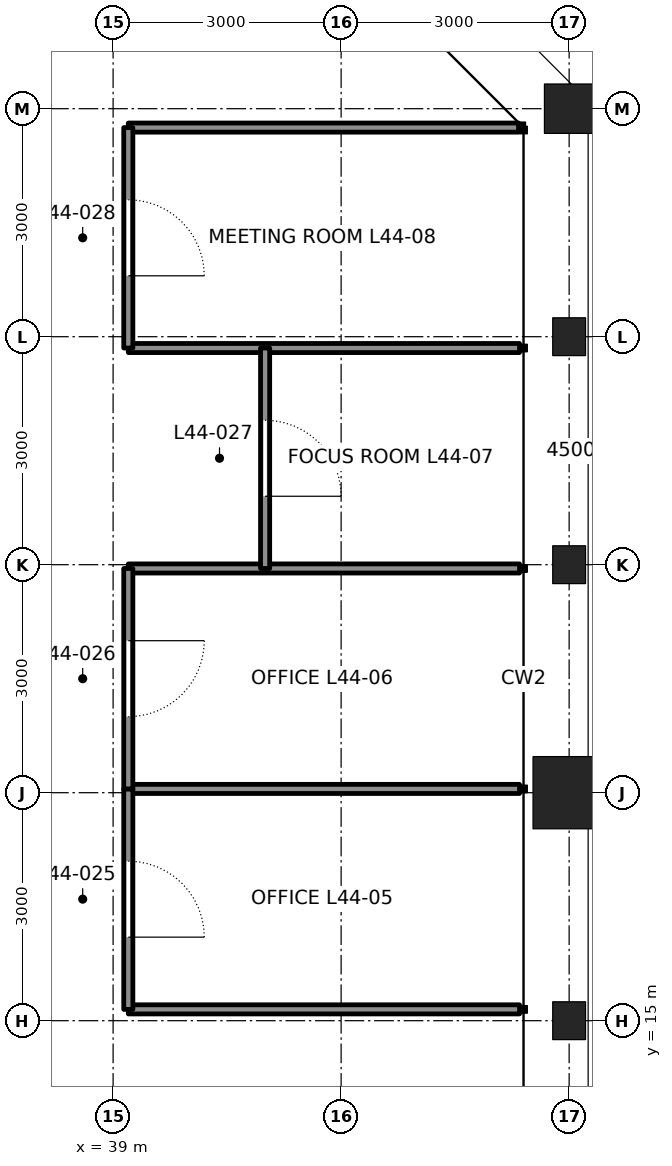
"""IFC4 building model, lengths in metres.
Left out: names, types, materials, properties, quantities, classifications, styles, units other than length and angle.
Written with IfcOpenShell. Run it as: python <this file> out.ifc"""

import sys

from ifc_helpers import new_model, si_unit, direction, frame, frame_2d, origin, origin_2d, place, context, subcontext, project, spatial, rectangle, hollow_rectangle, i_section, extrude, element, fill, save


model = new_model("IFC4")
c1 = context("Model", 3, precision=1e-05, world=origin(), true_north=direction((0.0, 1.0)))
c2 = subcontext(c1, "Body", "Model", "MODEL_VIEW")
j1 = project(units=[si_unit("LENGTHUNIT", "METRE"), si_unit("PLANEANGLEUNIT", "RADIAN")], contexts=[c1])
p1 = place(None, origin())
s1 = spatial("IfcSite", under=j1, at=p1, CompositionType="ELEMENT")
p2 = place(p1, origin())
s2 = spatial("IfcBuilding", under=s1, at=p2, CompositionType="ELEMENT")
p3 = place(p2, frame((0.0, 0.0, 201.3)))
s3 = spatial("IfcBuildingStorey", under=s2, at=p3, CompositionType="ELEMENT", Elevation=201.3)
p4 = place(p3, frame((45.0, 15.0, 0.0), z_axis=(0.0, 0.0, 1.0), x_axis=(1.0, 0.0, 0.0)))
e1 = element("IfcColumn", 1, at=p4, inside=s3, PredefinedType="COLUMN", context=c2, shape_type="SweptSolid", body=[
    extrude(i_section(OverallWidth=0.432, OverallDepth=0.498, WebThickness=0.056, FlangeThickness=0.089, at=origin_2d()), origin(), (0.0, 0.0, 1.0), 4.2),
])
p5 = place(p3, frame((45.0, 18.0, 0.0), z_axis=(0.0, 0.0, 1.0), x_axis=(1.0, 0.0, 0.0)))
e2 = element("IfcColumn", 2, at=p5, inside=s3, PredefinedType="COLUMN", context=c2, shape_type="SweptSolid", body=[
    extrude(hollow_rectangle(XDim=0.95, YDim=0.95, WallThickness=0.11, at=origin_2d()), origin(), (0.0, 0.0, 1.0), 4.2),
])
for number, where, z_axis, x_axis in (
    (3, (45.0, 21.0, 0.0), (0.0, 0.0, 1.0), (1.0, 0.0, 0.0)),
    (4, (45.0, 24.0, 0.0), (0.0, 0.0, 1.0), (1.0, 0.0, 0.0)),
):
    element("IfcColumn", number, at=place(p3, frame(where, z_axis=z_axis, x_axis=x_axis)), inside=s3, PredefinedType="COLUMN", context=c2, shape_type="SweptSolid", body=[
        extrude(i_section(OverallWidth=0.432, OverallDepth=0.498, WebThickness=0.056, FlangeThickness=0.089, at=origin_2d()), origin(), (0.0, 0.0, 1.0), 4.2),
    ])
p6 = place(p3, frame((45.0, 27.0, 0.0), z_axis=(0.0, 0.0, 1.0), x_axis=(1.0, 0.0, 0.0)))
e5 = element("IfcColumn", 5, at=p6, inside=s3, PredefinedType="COLUMN", context=c2, shape_type="SweptSolid", body=[
    extrude(hollow_rectangle(XDim=0.65, YDim=0.65, WallThickness=0.065, at=origin_2d()), origin(), (0.0, 0.0, 1.0), 4.2),
])
p7 = place(p3, frame((44.347, 15.149, 0.0), z_axis=(0.0, 0.0, 1.0), x_axis=(-1.0, 0.0, 0.0)))
e6 = element("IfcWall", 6, at=p7, inside=s3, PredefinedType="PARTITIONING", context=c2, shape_type="SweptSolid", body=[
    extrude(rectangle(XDim=5.147, YDim=0.12, at=frame_2d((2.574, 0.0))), origin(), (0.0, 0.0, 1.0), 4.04),
])
for number, where, z_axis, x_axis in (
    (7, (44.347, 18.05, 0.0), (0.0, 0.0, 1.0), (-1.0, 0.0, 0.0)),
    (8, (44.347, 20.95, 0.0), (0.0, 0.0, 1.0), (-1.0, 0.0, 0.0)),
):
    element("IfcWall", number, at=place(p3, frame(where, z_axis=z_axis, x_axis=x_axis)), inside=s3, PredefinedType="PARTITIONING", context=c2, shape_type="SweptSolid", body=[
        extrude(rectangle(XDim=5.147, YDim=0.12, at=frame_2d((2.574, 0.0))), origin(), (0.0, 0.0, 1.0), 3.357),
    ])
p8 = place(p3, frame((44.347, 23.851, 0.0), z_axis=(0.0, 0.0, 1.0), x_axis=(-1.0, 0.0, 0.0)))
e9 = element("IfcWall", 9, at=p8, inside=s3, PredefinedType="PARTITIONING", context=c2, shape_type="SweptSolid", body=[
    extrude(rectangle(XDim=5.147, YDim=0.12, at=frame_2d((2.574, 0.0))), origin(), (0.0, 0.0, 1.0), 4.04),
])
p9 = place(p3, frame((44.334, 26.751, 0.0), z_axis=(0.0, 0.0, 1.0), x_axis=(-1.0, 0.0, 0.0)))
e10 = element("IfcWall", 10, at=p9, inside=s3, PredefinedType="PARTITIONING", context=c2, shape_type="SweptSolid", body=[
    extrude(rectangle(XDim=5.134, YDim=0.12, at=frame_2d((2.567, 0.0))), origin(), (0.0, 0.0, 1.0), 4.04),
])
p10 = place(p3, frame((39.2, 15.149, 0.0), z_axis=(0.0, 0.0, 1.0), x_axis=(0.0, 1.0, 0.0)))
e11 = element("IfcWall", 11, at=p10, inside=s3, PredefinedType="PARTITIONING", context=c2, shape_type="SweptSolid", body=[
    extrude(rectangle(XDim=2.901, YDim=0.12, at=frame_2d((1.45, 0.0))), origin(), (0.0, 0.0, 1.0), 4.04),
])
p11 = place(p10, frame((0.95, 0.0, 0.0)))
e12 = element("IfcOpeningElement", 12, at=p11, cuts=e11, PredefinedType="OPENING", context=c2, shape_type="SweptSolid", body=[
    extrude(rectangle(XDim=1.0, YDim=2.4, at=frame_2d((0.5, 1.2))), frame((0.0, 0.07, 0.0), z_axis=(0.0, -1.0, 0.0), x_axis=(1.0, 0.0, 0.0)), (0.0, 0.0, 1.0), 0.14),
])
p12 = place(p3, frame((39.2, 18.05, 0.0), z_axis=(0.0, 0.0, 1.0), x_axis=(0.0, 1.0, 0.0)))
e13 = element("IfcWall", 13, at=p12, inside=s3, PredefinedType="PARTITIONING", context=c2, shape_type="SweptSolid", body=[
    extrude(rectangle(XDim=2.9, YDim=0.12, at=frame_2d((1.45, 0.0))), origin(), (0.0, 0.0, 1.0), 4.04),
])
p13 = place(p12, frame((0.95, 0.0, 0.0)))
e14 = element("IfcOpeningElement", 14, at=p13, cuts=e13, PredefinedType="OPENING", context=c2, shape_type="SweptSolid", body=[
    extrude(rectangle(XDim=1.0, YDim=2.4, at=frame_2d((0.5, 1.2))), frame((0.0, 0.07, 0.0), z_axis=(0.0, -1.0, 0.0), x_axis=(1.0, 0.0, 0.0)), (0.0, 0.0, 1.0), 0.14),
])
p14 = place(p3, frame((41.0, 20.95, 0.0), z_axis=(0.0, 0.0, 1.0), x_axis=(0.0, 1.0, 0.0)))
e15 = element("IfcWall", 15, at=p14, inside=s3, PredefinedType="PARTITIONING", context=c2, shape_type="SweptSolid", body=[
    extrude(rectangle(XDim=2.901, YDim=0.12, at=frame_2d((1.45, 0.0))), origin(), (0.0, 0.0, 1.0), 4.04),
])
p15 = place(p14, frame((0.95, 0.0, 0.0)))
e16 = element("IfcOpeningElement", 16, at=p15, cuts=e15, PredefinedType="OPENING", context=c2, shape_type="SweptSolid", body=[
    extrude(rectangle(XDim=1.0, YDim=2.4, at=frame_2d((0.5, 1.2))), frame((0.0, 0.07, 0.0), z_axis=(0.0, -1.0, 0.0), x_axis=(1.0, 0.0, 0.0)), (0.0, 0.0, 1.0), 0.14),
])
p16 = place(p3, frame((39.2, 23.851, 0.0), z_axis=(0.0, 0.0, 1.0), x_axis=(0.0, 1.0, 0.0)))
e17 = element("IfcWall", 17, at=p16, inside=s3, PredefinedType="PARTITIONING", context=c2, shape_type="SweptSolid", body=[
    extrude(rectangle(XDim=2.901, YDim=0.12, at=frame_2d((1.45, 0.0))), origin(), (0.0, 0.0, 1.0), 4.04),
])
p17 = place(p16, frame((0.95, 0.0, 0.0)))
e18 = element("IfcOpeningElement", 18, at=p17, cuts=e17, PredefinedType="OPENING", context=c2, shape_type="SweptSolid", body=[
    extrude(rectangle(XDim=1.0, YDim=2.4, at=frame_2d((0.5, 1.2))), frame((0.0, 0.07, 0.0), z_axis=(0.0, -1.0, 0.0), x_axis=(1.0, 0.0, 0.0)), (0.0, 0.0, 1.0), 0.14),
])
p18 = place(p11, frame((1.0, 0.0, 0.0), z_axis=(0.0, 0.0, 1.0), x_axis=(-1.0, 0.0, 0.0)))
e19 = element("IfcDoor", 19, at=p18, inside=s3, OperationType="SINGLE_SWING_RIGHT", PredefinedType="DOOR", context=c2, shape_type="SweptSolid", body=[
    extrude(rectangle(XDim=1.0, YDim=2.4, at=frame_2d((0.5, 1.2))), frame((0.0, 0.025, 0.0), z_axis=(0.0, -1.0, 0.0), x_axis=(1.0, 0.0, 0.0)), (0.0, 0.0, 1.0), 0.05),
])
fill(e12, e19)
p19 = place(p13, frame((1.0, 0.0, 0.0), z_axis=(0.0, 0.0, 1.0), x_axis=(-1.0, 0.0, 0.0)))
e20 = element("IfcDoor", 20, at=p19, inside=s3, OperationType="SINGLE_SWING_LEFT", PredefinedType="DOOR", context=c2, shape_type="SweptSolid", body=[
    extrude(rectangle(XDim=1.0, YDim=2.4, at=frame_2d((0.5, 1.2))), frame((0.0, 0.025, 0.0), z_axis=(0.0, -1.0, 0.0), x_axis=(1.0, 0.0, 0.0)), (0.0, 0.0, 1.0), 0.05),
])
fill(e14, e20)
p20 = place(p15, frame((1.0, 0.0, 0.0), z_axis=(0.0, 0.0, 1.0), x_axis=(-1.0, 0.0, 0.0)))
e21 = element("IfcDoor", 21, at=p20, inside=s3, OperationType="SINGLE_SWING_RIGHT", PredefinedType="DOOR", context=c2, shape_type="SweptSolid", body=[
    extrude(rectangle(XDim=1.0, YDim=2.4, at=frame_2d((0.5, 1.2))), frame((0.0, 0.025, 0.0), z_axis=(0.0, -1.0, 0.0), x_axis=(1.0, 0.0, 0.0)), (0.0, 0.0, 1.0), 0.05),
])
fill(e16, e21)
p21 = place(p17, frame((1.0, 0.0, 0.0), z_axis=(0.0, 0.0, 1.0), x_axis=(-1.0, 0.0, 0.0)))
e22 = element("IfcDoor", 22, at=p21, inside=s3, OperationType="SINGLE_SWING_RIGHT", PredefinedType="DOOR", context=c2, shape_type="SweptSolid", body=[
    extrude(rectangle(XDim=1.0, YDim=2.4, at=frame_2d((0.5, 1.2))), frame((0.0, 0.025, 0.0), z_axis=(0.0, -1.0, 0.0), x_axis=(1.0, 0.0, 0.0)), (0.0, 0.0, 1.0), 0.05),
])
fill(e18, e22)
save(model, sys.argv[1])
